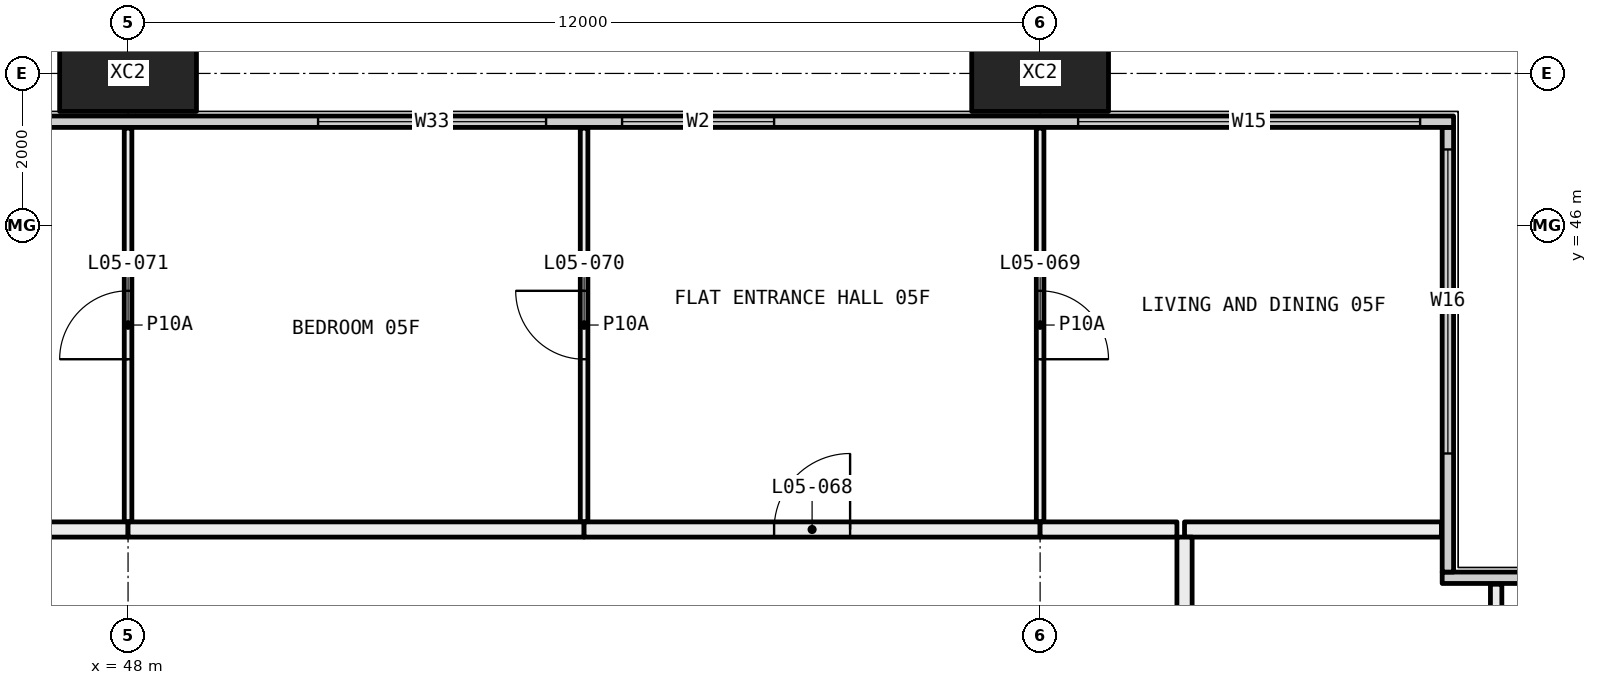
"""IFC4 building model, lengths in metres.
Left out: names, types, materials, properties, quantities, classifications, styles, units other than length and angle.
Written with IfcOpenShell. Run it as: python <this file> out.ifc"""

import sys

from ifc_helpers import new_model, si_unit, direction, frame, frame_2d, origin, origin_2d, place, context, subcontext, project, spatial, rectangle, hollow_rectangle, extrude, element, fill, save


model = new_model("IFC4")
c1 = context("Model", 3, precision=1e-05, world=origin(), true_north=direction((0.0, 1.0)))
c2 = subcontext(c1, "Body", "Model", "MODEL_VIEW")
j1 = project(units=[si_unit("LENGTHUNIT", "METRE"), si_unit("PLANEANGLEUNIT", "RADIAN")], contexts=[c1])
p1 = place(None, origin())
s1 = spatial("IfcSite", under=j1, at=p1, CompositionType="ELEMENT")
p2 = place(p1, origin())
s2 = spatial("IfcBuilding", under=s1, at=p2, CompositionType="ELEMENT")
p3 = place(p2, frame((0.0, 0.0, 30.0)))
s3 = spatial("IfcBuildingStorey", under=s2, at=p3, CompositionType="ELEMENT", Elevation=30.0)
for number, where, z_axis, x_axis in (
    (1, (48.0, 48.0, -0.4), (0.0, 0.0, 1.0), (1.0, 0.0, 0.0)),
    (2, (60.0, 48.0, -0.4), (0.0, 0.0, 1.0), (1.0, 0.0, 0.0)),
):
    element("IfcColumn", number, at=place(p3, frame(where, z_axis=z_axis, x_axis=x_axis)), inside=s3, PredefinedType="COLUMN", context=c2, shape_type="SweptSolid", body=[
        extrude(hollow_rectangle(XDim=1.8, YDim=1.0, WallThickness=0.07, at=origin_2d()), origin(), (0.0, 0.0, 1.0), 3.45),
    ])
p4 = place(p3, frame((65.29, 41.365, 0.0), z_axis=(0.0, 0.0, 1.0), x_axis=(1.0, 0.0, 0.0)))
e3 = element("IfcWall", 3, at=p4, inside=s3, PredefinedType="ELEMENTEDWALL", context=c2, shape_type="SweptSolid", body=[
    extrude(rectangle(XDim=6.15, YDim=0.15, at=frame_2d((3.075, 0.0))), origin(), (0.0, 0.0, 1.0), 3.05),
])
p5 = place(p4, frame((1.71, 0.0, 0.45)))
e4 = element("IfcOpeningElement", 4, at=p5, cuts=e3, PredefinedType="OPENING", context=c2, shape_type="SweptSolid", body=[
    extrude(rectangle(XDim=4.0, YDim=2.55, at=frame_2d((2.0, 1.275))), frame((0.0, 0.085, 0.0), z_axis=(0.0, -1.0, 0.0), x_axis=(1.0, 0.0, 0.0)), (0.0, 0.0, 1.0), 0.17),
])
p6 = place(p3, frame((65.365, 41.44, 0.0), z_axis=(0.0, 0.0, 1.0), x_axis=(0.0, 1.0, 0.0)))
e5 = element("IfcWall", 5, at=p6, inside=s3, PredefinedType="ELEMENTEDWALL", context=c2, shape_type="SweptSolid", body=[
    extrude(rectangle(XDim=5.85, YDim=0.15, at=frame_2d((2.925, 0.0))), origin(), (0.0, 0.0, 1.0), 3.05),
])
p7 = place(p6, frame((1.56, 0.0, 0.45)))
e6 = element("IfcOpeningElement", 6, at=p7, cuts=e5, PredefinedType="OPENING", context=c2, shape_type="SweptSolid", body=[
    extrude(rectangle(XDim=4.0, YDim=2.55, at=frame_2d((2.0, 1.275))), frame((0.0, 0.085, 0.0), z_axis=(0.0, -1.0, 0.0), x_axis=(1.0, 0.0, 0.0)), (0.0, 0.0, 1.0), 0.17),
])
p8 = place(p3, frame((6.56, 47.365, 0.0), z_axis=(0.0, 0.0, 1.0), x_axis=(1.0, 0.0, 0.0)))
e7 = element("IfcWall", 7, at=p8, inside=s3, PredefinedType="ELEMENTEDWALL", context=c2, shape_type="SweptSolid", body=[
    extrude(rectangle(XDim=58.88, YDim=0.15, at=frame_2d((29.44, 0.0))), origin(), (0.0, 0.0, 1.0), 3.05),
])
p9 = place(p8, frame((0.44, 0.0, 0.45)))
e8 = element("IfcOpeningElement", 8, at=p9, cuts=e7, PredefinedType="OPENING", context=c2, shape_type="SweptSolid", body=[
    extrude(rectangle(XDim=4.5, YDim=2.55, at=frame_2d((2.25, 1.275))), frame((0.0, 0.085, 0.0), z_axis=(0.0, -1.0, 0.0), x_axis=(1.0, 0.0, 0.0)), (0.0, 0.0, 1.0), 0.17),
])
p10 = place(p8, frame((7.94, 0.0, 0.45)))
e9 = element("IfcOpeningElement", 9, at=p10, cuts=e7, PredefinedType="OPENING", context=c2, shape_type="SweptSolid", body=[
    extrude(rectangle(XDim=3.0, YDim=2.55, at=frame_2d((1.5, 1.275))), frame((0.0, 0.085, 0.0), z_axis=(0.0, -1.0, 0.0), x_axis=(1.0, 0.0, 0.0)), (0.0, 0.0, 1.0), 0.17),
])
p11 = place(p8, frame((11.94, 0.0, 0.45)))
e10 = element("IfcOpeningElement", 10, at=p11, cuts=e7, PredefinedType="OPENING", context=c2, shape_type="SweptSolid", body=[
    extrude(rectangle(XDim=3.0, YDim=2.55, at=frame_2d((1.5, 1.275))), frame((0.0, 0.085, 0.0), z_axis=(0.0, -1.0, 0.0), x_axis=(1.0, 0.0, 0.0)), (0.0, 0.0, 1.0), 0.17),
])
p12 = place(p8, frame((19.94, 0.0, 0.45)))
e11 = element("IfcOpeningElement", 11, at=p12, cuts=e7, PredefinedType="OPENING", context=c2, shape_type="SweptSolid", body=[
    extrude(rectangle(XDim=3.0, YDim=2.55, at=frame_2d((1.5, 1.275))), frame((0.0, 0.085, 0.0), z_axis=(0.0, -1.0, 0.0), x_axis=(1.0, 0.0, 0.0)), (0.0, 0.0, 1.0), 0.17),
])
p13 = place(p8, frame((23.94, 0.0, 0.45)))
e12 = element("IfcOpeningElement", 12, at=p13, cuts=e7, PredefinedType="OPENING", context=c2, shape_type="SweptSolid", body=[
    extrude(rectangle(XDim=2.0, YDim=2.55, at=frame_2d((1.0, 1.275))), frame((0.0, 0.085, 0.0), z_axis=(0.0, -1.0, 0.0), x_axis=(1.0, 0.0, 0.0)), (0.0, 0.0, 1.0), 0.17),
])
p14 = place(p8, frame((31.94, 0.0, 0.45)))
e13 = element("IfcOpeningElement", 13, at=p14, cuts=e7, PredefinedType="OPENING", context=c2, shape_type="SweptSolid", body=[
    extrude(rectangle(XDim=3.0, YDim=2.55, at=frame_2d((1.5, 1.275))), frame((0.0, 0.085, 0.0), z_axis=(0.0, -1.0, 0.0), x_axis=(1.0, 0.0, 0.0)), (0.0, 0.0, 1.0), 0.17),
])
p15 = place(p8, frame((35.94, 0.0, 0.45)))
e14 = element("IfcOpeningElement", 14, at=p15, cuts=e7, PredefinedType="OPENING", context=c2, shape_type="SweptSolid", body=[
    extrude(rectangle(XDim=3.0, YDim=2.55, at=frame_2d((1.5, 1.275))), frame((0.0, 0.085, 0.0), z_axis=(0.0, -1.0, 0.0), x_axis=(1.0, 0.0, 0.0)), (0.0, 0.0, 1.0), 0.17),
])
p16 = place(p8, frame((43.94, 0.0, 0.45)))
e15 = element("IfcOpeningElement", 15, at=p16, cuts=e7, PredefinedType="OPENING", context=c2, shape_type="SweptSolid", body=[
    extrude(rectangle(XDim=3.0, YDim=2.55, at=frame_2d((1.5, 1.275))), frame((0.0, 0.085, 0.0), z_axis=(0.0, -1.0, 0.0), x_axis=(1.0, 0.0, 0.0)), (0.0, 0.0, 1.0), 0.17),
])
p17 = place(p8, frame((47.94, 0.0, 0.45)))
e16 = element("IfcOpeningElement", 16, at=p17, cuts=e7, PredefinedType="OPENING", context=c2, shape_type="SweptSolid", body=[
    extrude(rectangle(XDim=2.0, YDim=2.55, at=frame_2d((1.0, 1.275))), frame((0.0, 0.085, 0.0), z_axis=(0.0, -1.0, 0.0), x_axis=(1.0, 0.0, 0.0)), (0.0, 0.0, 1.0), 0.17),
])
p18 = place(p8, frame((53.94, 0.0, 0.45)))
e17 = element("IfcOpeningElement", 17, at=p18, cuts=e7, PredefinedType="OPENING", context=c2, shape_type="SweptSolid", body=[
    extrude(rectangle(XDim=4.5, YDim=2.55, at=frame_2d((2.25, 1.275))), frame((0.0, 0.085, 0.0), z_axis=(0.0, -1.0, 0.0), x_axis=(1.0, 0.0, 0.0)), (0.0, 0.0, 1.0), 0.17),
])
p19 = place(p3, frame((66.0, 41.28, 0.0), z_axis=(0.0, 0.0, 1.0), x_axis=(0.0, -1.0, 0.0)))
e18 = element("IfcWall", 18, at=p19, inside=s3, PredefinedType="PARTITIONING", context=c2, shape_type="SweptSolid", body=[
    extrude(rectangle(XDim=3.78, YDim=0.15, at=frame_2d((1.89, 0.0))), origin(), (0.0, 0.0, 1.0), 3.05),
])
p20 = place(p3, frame((65.28, 42.0, 0.0), z_axis=(0.0, 0.0, 1.0), x_axis=(-1.0, 0.0, 0.0)))
e19 = element("IfcWall", 19, at=p20, inside=s3, PredefinedType="PARTITIONING", context=c2, shape_type="SweptSolid", body=[
    extrude(rectangle(XDim=3.38, YDim=0.2, at=frame_2d((1.69, 0.0))), origin(), (0.0, 0.0, 1.0), 3.05),
])
p21 = place(p3, frame((61.9, 41.9, 0.0), z_axis=(0.0, 0.0, 1.0), x_axis=(0.0, -1.0, 0.0)))
e20 = element("IfcWall", 20, at=p21, inside=s3, PredefinedType="PARTITIONING", context=c2, shape_type="SweptSolid", body=[
    extrude(rectangle(XDim=4.4, YDim=0.2, at=frame_2d((2.2, 0.0))), origin(), (0.0, 0.0, 1.0), 3.05),
])
p22 = place(p3, frame((48.0, 42.1, 0.0), z_axis=(0.0, 0.0, 1.0), x_axis=(0.0, 1.0, 0.0)))
e21 = element("IfcWall", 21, at=p22, inside=s3, PredefinedType="PARTITIONING", context=c2, shape_type="SweptSolid", body=[
    extrude(rectangle(XDim=5.18, YDim=0.1, at=frame_2d((2.59, 0.0))), origin(), (0.0, 0.0, 1.0), 3.05),
])
p23 = place(p22, frame((2.14, 0.0, 0.0)))
e22 = element("IfcOpeningElement", 22, at=p23, cuts=e21, PredefinedType="OPENING", context=c2, shape_type="SweptSolid", body=[
    extrude(rectangle(XDim=0.9, YDim=2.1, at=frame_2d((0.45, 1.05))), frame((0.0, 0.06, 0.0), z_axis=(0.0, -1.0, 0.0), x_axis=(1.0, 0.0, 0.0)), (0.0, 0.0, 1.0), 0.12),
])
p24 = place(p3, frame((46.1, 42.0, 0.0), z_axis=(0.0, 0.0, 1.0), x_axis=(1.0, 0.0, 0.0)))
e23 = element("IfcWall", 23, at=p24, inside=s3, PredefinedType="PARTITIONING", context=c2, shape_type="SweptSolid", body=[
    extrude(rectangle(XDim=1.9, YDim=0.2, at=frame_2d((0.95, 0.0))), origin(), (0.0, 0.0, 1.0), 3.05),
])
p25 = place(p3, frame((54.0, 42.1, 0.0), z_axis=(0.0, 0.0, 1.0), x_axis=(0.0, 1.0, 0.0)))
e24 = element("IfcWall", 24, at=p25, inside=s3, PredefinedType="PARTITIONING", context=c2, shape_type="SweptSolid", body=[
    extrude(rectangle(XDim=5.18, YDim=0.1, at=frame_2d((2.59, 0.0))), origin(), (0.0, 0.0, 1.0), 3.05),
])
p26 = place(p25, frame((2.14, 0.0, 0.0)))
e25 = element("IfcOpeningElement", 25, at=p26, cuts=e24, PredefinedType="OPENING", context=c2, shape_type="SweptSolid", body=[
    extrude(rectangle(XDim=0.9, YDim=2.1, at=frame_2d((0.45, 1.05))), frame((0.0, 0.06, 0.0), z_axis=(0.0, -1.0, 0.0), x_axis=(1.0, 0.0, 0.0)), (0.0, 0.0, 1.0), 0.12),
])
p27 = place(p3, frame((48.0, 42.0, 0.0), z_axis=(0.0, 0.0, 1.0), x_axis=(1.0, 0.0, 0.0)))
e26 = element("IfcWall", 26, at=p27, inside=s3, PredefinedType="PARTITIONING", context=c2, shape_type="SweptSolid", body=[
    extrude(rectangle(XDim=6.0, YDim=0.2, at=frame_2d((3.0, 0.0))), origin(), (0.0, 0.0, 1.0), 3.05),
])
p28 = place(p3, frame((60.0, 42.1, 0.0), z_axis=(0.0, 0.0, 1.0), x_axis=(0.0, 1.0, 0.0)))
e27 = element("IfcWall", 27, at=p28, inside=s3, PredefinedType="PARTITIONING", context=c2, shape_type="SweptSolid", body=[
    extrude(rectangle(XDim=5.18, YDim=0.1, at=frame_2d((2.59, 0.0))), origin(), (0.0, 0.0, 1.0), 3.05),
])
p29 = place(p28, frame((2.14, 0.0, 0.0)))
e28 = element("IfcOpeningElement", 28, at=p29, cuts=e27, PredefinedType="OPENING", context=c2, shape_type="SweptSolid", body=[
    extrude(rectangle(XDim=0.9, YDim=2.1, at=frame_2d((0.45, 1.05))), frame((0.0, 0.06, 0.0), z_axis=(0.0, -1.0, 0.0), x_axis=(1.0, 0.0, 0.0)), (0.0, 0.0, 1.0), 0.12),
])
p30 = place(p3, frame((54.0, 42.0, 0.0), z_axis=(0.0, 0.0, 1.0), x_axis=(1.0, 0.0, 0.0)))
e29 = element("IfcWall", 29, at=p30, inside=s3, PredefinedType="PARTITIONING", context=c2, shape_type="SweptSolid", body=[
    extrude(rectangle(XDim=6.0, YDim=0.2, at=frame_2d((3.0, 0.0))), origin(), (0.0, 0.0, 1.0), 3.05),
])
p31 = place(p30, frame((2.5, 0.0, 0.0)))
e30 = element("IfcOpeningElement", 30, at=p31, cuts=e29, PredefinedType="OPENING", context=c2, shape_type="SweptSolid", body=[
    extrude(rectangle(XDim=1.0, YDim=2.1, at=frame_2d((0.5, 1.05))), frame((0.0, 0.11, 0.0), z_axis=(0.0, -1.0, 0.0), x_axis=(1.0, 0.0, 0.0)), (0.0, 0.0, 1.0), 0.22),
])
p32 = place(p3, frame((60.0, 42.0, 0.0), z_axis=(0.0, 0.0, 1.0), x_axis=(1.0, 0.0, 0.0)))
e31 = element("IfcWall", 31, at=p32, inside=s3, PredefinedType="PARTITIONING", context=c2, shape_type="SweptSolid", body=[
    extrude(rectangle(XDim=1.8, YDim=0.2, at=frame_2d((0.9, 0.0))), origin(), (0.0, 0.0, 1.0), 3.05),
])
p33 = place(p7, origin())
e32 = element("IfcWindow", 32, at=p33, inside=s3, PartitioningType="SINGLE_PANEL", PredefinedType="WINDOW", context=c2, shape_type="SweptSolid", body=[
    extrude(rectangle(XDim=4.0, YDim=2.55, at=frame_2d((2.0, 1.275))), frame((0.0, 0.03, 0.0), z_axis=(0.0, -1.0, 0.0), x_axis=(1.0, 0.0, 0.0)), (0.0, 0.0, 1.0), 0.06),
])
fill(e6, e32)
p34 = place(p16, origin())
e33 = element("IfcWindow", 33, at=p34, inside=s3, PartitioningType="SINGLE_PANEL", PredefinedType="WINDOW", context=c2, shape_type="SweptSolid", body=[
    extrude(rectangle(XDim=3.0, YDim=2.55, at=frame_2d((1.5, 1.275))), frame((0.0, 0.03, 0.0), z_axis=(0.0, -1.0, 0.0), x_axis=(1.0, 0.0, 0.0)), (0.0, 0.0, 1.0), 0.06),
])
fill(e15, e33)
p35 = place(p17, origin())
e34 = element("IfcWindow", 34, at=p35, inside=s3, PartitioningType="SINGLE_PANEL", PredefinedType="WINDOW", context=c2, shape_type="SweptSolid", body=[
    extrude(rectangle(XDim=2.0, YDim=2.55, at=frame_2d((1.0, 1.275))), frame((0.0, 0.03, 0.0), z_axis=(0.0, -1.0, 0.0), x_axis=(1.0, 0.0, 0.0)), (0.0, 0.0, 1.0), 0.06),
])
fill(e16, e34)
p36 = place(p18, origin())
e35 = element("IfcWindow", 35, at=p36, inside=s3, PartitioningType="SINGLE_PANEL", PredefinedType="WINDOW", context=c2, shape_type="SweptSolid", body=[
    extrude(rectangle(XDim=4.5, YDim=2.55, at=frame_2d((2.25, 1.275))), frame((0.0, 0.03, 0.0), z_axis=(0.0, -1.0, 0.0), x_axis=(1.0, 0.0, 0.0)), (0.0, 0.0, 1.0), 0.06),
])
fill(e17, e35)
p37 = place(p31, origin())
e36 = element("IfcDoor", 36, at=p37, inside=s3, OperationType="SINGLE_SWING_LEFT", PredefinedType="DOOR", context=c2, shape_type="SweptSolid", body=[
    extrude(rectangle(XDim=1.0, YDim=2.1, at=frame_2d((0.5, 1.05))), frame((0.0, 0.025, 0.0), z_axis=(0.0, -1.0, 0.0), x_axis=(1.0, 0.0, 0.0)), (0.0, 0.0, 1.0), 0.05),
])
fill(e30, e36)
p38 = place(p29, frame((0.9, 0.0, 0.0), x_axis=(-1.0, 0.0, 0.0)))
e37 = element("IfcDoor", 37, at=p38, inside=s3, OperationType="SINGLE_SWING_LEFT", PredefinedType="DOOR", context=c2, shape_type="SweptSolid", body=[
    extrude(rectangle(XDim=0.9, YDim=2.1, at=frame_2d((0.45, 1.05))), frame((0.0, 0.025, 0.0), z_axis=(0.0, -1.0, 0.0), x_axis=(1.0, 0.0, 0.0)), (0.0, 0.0, 1.0), 0.05),
])
fill(e28, e37)
p39 = place(p26, origin())
e38 = element("IfcDoor", 38, at=p39, inside=s3, OperationType="SINGLE_SWING_LEFT", PredefinedType="DOOR", context=c2, shape_type="SweptSolid", body=[
    extrude(rectangle(XDim=0.9, YDim=2.1, at=frame_2d((0.45, 1.05))), frame((0.0, 0.025, 0.0), z_axis=(0.0, -1.0, 0.0), x_axis=(1.0, 0.0, 0.0)), (0.0, 0.0, 1.0), 0.05),
])
fill(e25, e38)
p40 = place(p23, origin())
e39 = element("IfcDoor", 39, at=p40, inside=s3, OperationType="SINGLE_SWING_RIGHT", PredefinedType="DOOR", context=c2, shape_type="SweptSolid", body=[
    extrude(rectangle(XDim=0.9, YDim=2.1, at=frame_2d((0.45, 1.05))), frame((0.0, 0.025, 0.0), z_axis=(0.0, -1.0, 0.0), x_axis=(1.0, 0.0, 0.0)), (0.0, 0.0, 1.0), 0.05),
])
fill(e22, e39)
save(model, sys.argv[1])
